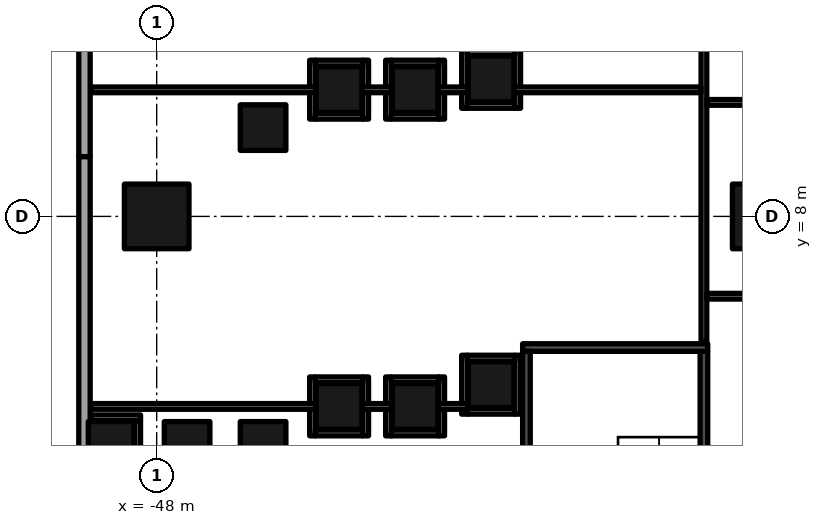
"""IFC4 building model, lengths in metres.
Left out: names, types, materials, properties, quantities, classifications, styles, units other than length and angle.
Written with IfcOpenShell. Run it as: python <this file> out.ifc"""

import sys

from ifc_helpers import new_model, si_unit, direction, frame, frame_2d, origin, origin_2d, place, context, subcontext, project, spatial, rectangle, extrude, element, fill, save


model = new_model("IFC4")
c1 = context("Model", 3, precision=1e-05, world=origin(), true_north=direction((0.0, 1.0)))
c2 = subcontext(c1, "Body", "Model", "MODEL_VIEW")
j1 = project(units=[si_unit("LENGTHUNIT", "METRE"), si_unit("PLANEANGLEUNIT", "RADIAN")], contexts=[c1])
p1 = place(None, origin())
s1 = spatial("IfcSite", under=j1, at=p1, CompositionType="ELEMENT")
p2 = place(p1, origin())
s2 = spatial("IfcBuilding", under=s1, at=p2, CompositionType="ELEMENT")
p3 = place(p2, origin())
s3 = spatial("IfcBuildingStorey", under=s2, at=p3, CompositionType="ELEMENT", Elevation=0.0)
for number, where, z_axis, x_axis in (
    (1, (-48.0, 8.0, 0.0), (0.0, 0.0, 1.0), (1.0, 0.0, 0.0)),
    (2, (-32.0, 8.0, 0.0), (0.0, 0.0, 1.0), (1.0, 0.0, 0.0)),
):
    element("IfcColumn", number, at=place(p3, frame(where, z_axis=z_axis, x_axis=x_axis)), inside=s3, PredefinedType="COLUMN", context=c2, shape_type="SweptSolid", body=[
        extrude(rectangle(XDim=1.7, YDim=1.7, at=origin_2d()), origin(), (0.0, 0.0, 1.0), 9.0),
    ])
for number, where, z_axis, x_axis in (
    (3, (-39.2, 3.572, 0.0), (0.0, 0.0, 1.0), (1.0, 0.0, 0.0)),
    (4, (-39.2, 11.62, 0.0), (0.0, 0.0, 1.0), (1.0, 0.0, 0.0)),
    (5, (-41.2, 3.001, 0.0), (0.0, 0.0, 1.0), (1.0, 0.0, 0.0)),
    (6, (-41.2, 11.337, 0.0), (0.0, 0.0, 1.0), (1.0, 0.0, 0.0)),
    (7, (-43.2, 3.001, 0.0), (0.0, 0.0, 1.0), (1.0, 0.0, 0.0)),
    (8, (-43.2, 11.337, 0.0), (0.0, 0.0, 1.0), (1.0, 0.0, 0.0)),
    (9, (-45.2, 2.001, 0.0), (0.0, 0.0, 1.0), (1.0, 0.0, 0.0)),
    (10, (-45.2, 10.337, 0.0), (0.0, 0.0, 1.0), (1.0, 0.0, 0.0)),
    (11, (-47.2, 2.001, 0.0), (0.0, 0.0, 1.0), (1.0, 0.0, 0.0)),
    (12, (-49.2, 2.001, 0.0), (0.0, 0.0, 1.0), (1.0, 0.0, 0.0)),
):
    element("IfcColumn", number, at=place(p3, frame(where, z_axis=z_axis, x_axis=x_axis)), inside=s3, PredefinedType="COLUMN", context=c2, shape_type="SweptSolid", body=[
        extrude(rectangle(XDim=1.2, YDim=1.2, at=origin_2d()), origin(), (0.0, 0.0, 1.0), 9.0),
    ])
p4 = place(p3, frame((-49.9, 13.673, 0.0), z_axis=(0.0, 0.0, 1.0), x_axis=(0.0, -1.0, 0.0)))
e13 = element("IfcWall", 13, at=p4, inside=s3, PredefinedType="ELEMENTEDWALL", context=c2, shape_type="SweptSolid", body=[
    extrude(rectangle(XDim=4.102, YDim=0.3, at=frame_2d((2.051, 0.0))), origin(), (0.0, 0.0, 1.0), 7.6),
])
p5 = place(p4, frame((0.327, 0.0, 0.0)))
e14 = element("IfcOpeningElement", 14, at=p5, cuts=e13, PredefinedType="OPENING", context=c2, shape_type="SweptSolid", body=[
    extrude(rectangle(XDim=1.2, YDim=2.7, at=frame_2d((0.6, 1.35))), frame((0.0, 0.16, 0.0), z_axis=(0.0, -1.0, 0.0), x_axis=(1.0, 0.0, 0.0)), (0.0, 0.0, 1.0), 0.32),
])
p6 = place(p3, frame((-49.9, 9.571, 0.0), z_axis=(0.0, 0.0, 1.0), x_axis=(0.0, -1.0, 0.0)))
e15 = element("IfcWall", 15, at=p6, inside=s3, PredefinedType="ELEMENTEDWALL", context=c2, shape_type="SweptSolid", body=[
    extrude(rectangle(XDim=7.673, YDim=0.3, at=frame_2d((3.836, 0.0))), origin(), (0.0, 0.0, 1.0), 7.6),
])
p7 = place(p6, frame((2.575, 0.0, 0.0)))
e16 = element("IfcOpeningElement", 16, at=p7, cuts=e15, PredefinedType="OPENING", context=c2, shape_type="SweptSolid", body=[
    extrude(rectangle(XDim=3.0, YDim=2.7, at=frame_2d((1.5, 1.35))), frame((0.0, 0.16, 0.0), z_axis=(0.0, -1.0, 0.0), x_axis=(1.0, 0.0, 0.0)), (0.0, 0.0, 1.0), 0.32),
])
for number, where, z_axis, x_axis in (
    (17, (-49.85, 18.79, 9.0), (0.0, 0.0, 1.0), (0.0, -1.0, 0.0)),
    (18, (-49.85, 4.093, 9.0), (0.0, 0.0, 1.0), (0.0, -1.0, 0.0)),
):
    element("IfcWall", number, at=place(p3, frame(where, z_axis=z_axis, x_axis=x_axis)), inside=s3, PredefinedType="PARAPET", context=c2, shape_type="SweptSolid", body=[
        extrude(rectangle(XDim=14.698, YDim=0.3, at=frame_2d((7.349, 0.0))), origin(), (0.0, 0.0, 1.0), 1.1),
    ])
p8 = place(p3, frame((-38.37, 4.55, 0.0), z_axis=(0.0, 0.0, 1.0), x_axis=(1.0, 0.0, 0.0)))
e19 = element("IfcWall", 19, at=p8, inside=s3, PredefinedType="SOLIDWALL", context=c2, shape_type="SweptSolid", body=[
    extrude(rectangle(XDim=4.87, YDim=0.2, at=frame_2d((2.435, 0.0))), origin(), (0.0, 0.0, 1.0), 8.5),
])
p9 = place(p3, frame((-38.27, -2.2, 0.0), z_axis=(0.0, 0.0, 1.0), x_axis=(0.0, 1.0, 0.0)))
e20 = element("IfcWall", 20, at=p9, inside=s3, PredefinedType="SOLIDWALL", context=c2, shape_type="SweptSolid", body=[
    extrude(rectangle(XDim=6.65, YDim=0.2, at=frame_2d((3.325, 0.0))), origin(), (0.0, 0.0, 1.0), 8.5),
])
p10 = place(p9, frame((0.1, 0.0, 0.0)))
e21 = element("IfcOpeningElement", 21, at=p10, cuts=e20, PredefinedType="OPENING", context=c2, shape_type="SweptSolid", body=[
    extrude(rectangle(XDim=1.8, YDim=2.4, at=frame_2d((0.9, 1.2))), frame((0.0, 0.11, 0.0), z_axis=(0.0, -1.0, 0.0), x_axis=(1.0, 0.0, 0.0)), (0.0, 0.0, 1.0), 0.22),
])
p11 = place(p3, frame((-33.6, -2.2, 0.0), z_axis=(0.0, 0.0, 1.0), x_axis=(0.0, 1.0, 0.0)))
e22 = element("IfcWall", 22, at=p11, inside=s3, PredefinedType="SOLIDWALL", context=c2, shape_type="SweptSolid", body=[
    extrude(rectangle(XDim=6.65, YDim=0.2, at=frame_2d((3.325, 0.0))), origin(), (0.0, 0.0, 1.0), 8.5),
])
p12 = place(p11, frame((0.1, 0.0, 0.0)))
e23 = element("IfcOpeningElement", 23, at=p12, cuts=e22, PredefinedType="OPENING", context=c2, shape_type="SweptSolid", body=[
    extrude(rectangle(XDim=1.8, YDim=2.4, at=frame_2d((0.9, 1.2))), frame((0.0, 0.11, 0.0), z_axis=(0.0, -1.0, 0.0), x_axis=(1.0, 0.0, 0.0)), (0.0, 0.0, 1.0), 0.22),
])
p13 = place(p3, frame((-48.5, 1.376, 0.0), z_axis=(0.0, 0.0, 1.0), x_axis=(0.0, 1.0, 0.0)))
e24 = element("IfcWall", 24, at=p13, inside=s3, PredefinedType="PARTITIONING", context=c2, shape_type="SweptSolid", body=[
    extrude(rectangle(XDim=1.25, YDim=0.15, at=frame_2d((0.625, 0.0))), origin(), (0.0, 0.0, 1.0), 8.5),
])
p14 = place(p3, frame((-43.9, 2.226, 0.0), z_axis=(0.0, 0.0, 1.0), x_axis=(0.0, 1.0, 0.0)))
e25 = element("IfcWall", 25, at=p14, inside=s3, PredefinedType="PARTITIONING", context=c2, shape_type="SweptSolid", body=[
    extrude(rectangle(XDim=1.55, YDim=0.15, at=frame_2d((0.775, 0.0))), origin(), (0.0, 0.0, 1.0), 8.5),
])
p15 = place(p3, frame((-43.825, 2.301, 0.0), z_axis=(0.0, 0.0, 1.0), x_axis=(1.0, 0.0, 0.0)))
e26 = element("IfcWall", 26, at=p15, inside=s3, PredefinedType="PARTITIONING", context=c2, shape_type="SweptSolid", body=[
    extrude(rectangle(XDim=1.25, YDim=0.15, at=frame_2d((0.625, 0.0))), origin(), (0.0, 0.0, 1.0), 8.5),
])
for number, where, z_axis, x_axis in (
    (27, (-42.5, 2.226, 0.0), (0.0, 0.0, 1.0), (0.0, 1.0, 0.0)),
    (28, (-41.9, 2.226, 0.0), (0.0, 0.0, 1.0), (0.0, 1.0, 0.0)),
):
    element("IfcWall", number, at=place(p3, frame(where, z_axis=z_axis, x_axis=x_axis)), inside=s3, PredefinedType="PARTITIONING", context=c2, shape_type="SweptSolid", body=[
        extrude(rectangle(XDim=1.55, YDim=0.15, at=frame_2d((0.775, 0.0))), origin(), (0.0, 0.0, 1.0), 8.5),
    ])
p16 = place(p3, frame((-41.825, 2.301, 0.0), z_axis=(0.0, 0.0, 1.0), x_axis=(1.0, 0.0, 0.0)))
e29 = element("IfcWall", 29, at=p16, inside=s3, PredefinedType="PARTITIONING", context=c2, shape_type="SweptSolid", body=[
    extrude(rectangle(XDim=1.25, YDim=0.15, at=frame_2d((0.625, 0.0))), origin(), (0.0, 0.0, 1.0), 8.5),
])
p17 = place(p3, frame((-40.5, 2.226, 0.0), z_axis=(0.0, 0.0, 1.0), x_axis=(0.0, 1.0, 0.0)))
e30 = element("IfcWall", 30, at=p17, inside=s3, PredefinedType="PARTITIONING", context=c2, shape_type="SweptSolid", body=[
    extrude(rectangle(XDim=1.55, YDim=0.15, at=frame_2d((0.775, 0.0))), origin(), (0.0, 0.0, 1.0), 8.5),
])
p18 = place(p3, frame((-49.72, 2.701, 0.0), z_axis=(0.0, 0.0, 1.0), x_axis=(1.0, 0.0, 0.0)))
e31 = element("IfcWall", 31, at=p18, inside=s3, PredefinedType="PARTITIONING", context=c2, shape_type="SweptSolid", body=[
    extrude(rectangle(XDim=1.295, YDim=0.15, at=frame_2d((0.647, 0.0))), origin(), (0.0, 0.0, 1.0), 8.5),
])
p19 = place(p3, frame((-39.9, 2.797, 0.0), z_axis=(0.0, 0.0, 1.0), x_axis=(0.0, 1.0, 0.0)))
e32 = element("IfcWall", 32, at=p19, inside=s3, PredefinedType="PARTITIONING", context=c2, shape_type="SweptSolid", body=[
    extrude(rectangle(XDim=1.55, YDim=0.15, at=frame_2d((0.775, 0.0))), origin(), (0.0, 0.0, 1.0), 8.5),
])
p20 = place(p3, frame((-39.825, 2.872, 0.0), z_axis=(0.0, 0.0, 1.0), x_axis=(1.0, 0.0, 0.0)))
e33 = element("IfcWall", 33, at=p20, inside=s3, PredefinedType="PARTITIONING", context=c2, shape_type="SweptSolid", body=[
    extrude(rectangle(XDim=1.25, YDim=0.15, at=frame_2d((0.625, 0.0))), origin(), (0.0, 0.0, 1.0), 8.5),
])
p21 = place(p3, frame((-38.5, 2.797, 0.0), z_axis=(0.0, 0.0, 1.0), x_axis=(0.0, 1.0, 0.0)))
e34 = element("IfcWall", 34, at=p21, inside=s3, PredefinedType="PARTITIONING", context=c2, shape_type="SweptSolid", body=[
    extrude(rectangle(XDim=1.55, YDim=0.15, at=frame_2d((0.775, 0.0))), origin(), (0.0, 0.0, 1.0), 8.5),
])
p22 = place(p3, frame((-49.72, 3.0, 0.0), z_axis=(0.0, 0.0, 1.0), x_axis=(1.0, 0.0, 0.0)))
e35 = element("IfcWall", 35, at=p22, inside=s3, PredefinedType="PARTITIONING", context=c2, shape_type="SweptSolid", body=[
    extrude(rectangle(XDim=5.92, YDim=0.15, at=frame_2d((2.96, 0.0))), origin(), (0.0, 0.0, 1.0), 7.6),
])
for number, where, z_axis, x_axis in (
    (36, (-42.6, 3.0, 0.0), (0.0, 0.0, 1.0), (1.0, 0.0, 0.0)),
    (37, (-40.6, 3.0, 0.0), (0.0, 0.0, 1.0), (1.0, 0.0, 0.0)),
):
    element("IfcWall", number, at=place(p3, frame(where, z_axis=z_axis, x_axis=x_axis)), inside=s3, PredefinedType="PARTITIONING", context=c2, shape_type="SweptSolid", body=[
        extrude(rectangle(XDim=0.8, YDim=0.15, at=frame_2d((0.4, 0.0))), origin(), (0.0, 0.0, 1.0), 8.5),
    ])
for number, where, z_axis, x_axis in (
    (38, (-43.825, 3.701, 0.0), (0.0, 0.0, 1.0), (1.0, 0.0, 0.0)),
    (39, (-41.825, 3.701, 0.0), (0.0, 0.0, 1.0), (1.0, 0.0, 0.0)),
    (40, (-39.825, 4.272, 0.0), (0.0, 0.0, 1.0), (1.0, 0.0, 0.0)),
):
    element("IfcWall", number, at=place(p3, frame(where, z_axis=z_axis, x_axis=x_axis)), inside=s3, PredefinedType="PARTITIONING", context=c2, shape_type="SweptSolid", body=[
        extrude(rectangle(XDim=1.25, YDim=0.15, at=frame_2d((0.625, 0.0))), origin(), (0.0, 0.0, 1.0), 8.5),
    ])
p23 = place(p3, frame((-33.6, 4.69, 0.0), z_axis=(0.0, 0.0, 1.0), x_axis=(0.0, 1.0, 0.0)))
e41 = element("IfcWall", 41, at=p23, inside=s3, PredefinedType="PARTITIONING", context=c2, shape_type="SweptSolid", body=[
    extrude(rectangle(XDim=9.07, YDim=0.15, at=frame_2d((4.535, 0.0))), origin(), (0.0, 0.0, 1.0), 7.3),
])
p24 = place(p3, frame((-33.525, 5.9, 0.0), z_axis=(0.0, 0.0, 1.0), x_axis=(1.0, 0.0, 0.0)))
e42 = element("IfcWall", 42, at=p24, inside=s3, PredefinedType="PARTITIONING", context=c2, shape_type="SweptSolid", body=[
    extrude(rectangle(XDim=3.85, YDim=0.15, at=frame_2d((1.925, 0.0))), origin(), (0.0, 0.0, 1.0), 7.3),
])
p25 = place(p3, frame((-43.9, 10.56, 0.0), z_axis=(0.0, 0.0, 1.0), x_axis=(0.0, 1.0, 0.0)))
e43 = element("IfcWall", 43, at=p25, inside=s3, PredefinedType="PARTITIONING", context=c2, shape_type="SweptSolid", body=[
    extrude(rectangle(XDim=1.55, YDim=0.15, at=frame_2d((0.775, 0.0))), origin(), (0.0, 0.0, 1.0), 8.5),
])
p26 = place(p3, frame((-43.825, 10.635, 0.0), z_axis=(0.0, 0.0, 1.0), x_axis=(1.0, 0.0, 0.0)))
e44 = element("IfcWall", 44, at=p26, inside=s3, PredefinedType="PARTITIONING", context=c2, shape_type="SweptSolid", body=[
    extrude(rectangle(XDim=1.25, YDim=0.15, at=frame_2d((0.625, 0.0))), origin(), (0.0, 0.0, 1.0), 8.5),
])
for number, where, z_axis, x_axis in (
    (45, (-42.5, 10.56, 0.0), (0.0, 0.0, 1.0), (0.0, 1.0, 0.0)),
    (46, (-41.9, 10.56, 0.0), (0.0, 0.0, 1.0), (0.0, 1.0, 0.0)),
):
    element("IfcWall", number, at=place(p3, frame(where, z_axis=z_axis, x_axis=x_axis)), inside=s3, PredefinedType="PARTITIONING", context=c2, shape_type="SweptSolid", body=[
        extrude(rectangle(XDim=1.55, YDim=0.15, at=frame_2d((0.775, 0.0))), origin(), (0.0, 0.0, 1.0), 8.5),
    ])
p27 = place(p3, frame((-41.825, 10.635, 0.0), z_axis=(0.0, 0.0, 1.0), x_axis=(1.0, 0.0, 0.0)))
e47 = element("IfcWall", 47, at=p27, inside=s3, PredefinedType="PARTITIONING", context=c2, shape_type="SweptSolid", body=[
    extrude(rectangle(XDim=1.25, YDim=0.15, at=frame_2d((0.625, 0.0))), origin(), (0.0, 0.0, 1.0), 8.5),
])
for number, where, z_axis, x_axis in (
    (48, (-40.5, 10.56, 0.0), (0.0, 0.0, 1.0), (0.0, 1.0, 0.0)),
    (49, (-39.9, 10.845, 0.0), (0.0, 0.0, 1.0), (0.0, 1.0, 0.0)),
):
    element("IfcWall", number, at=place(p3, frame(where, z_axis=z_axis, x_axis=x_axis)), inside=s3, PredefinedType="PARTITIONING", context=c2, shape_type="SweptSolid", body=[
        extrude(rectangle(XDim=1.55, YDim=0.15, at=frame_2d((0.775, 0.0))), origin(), (0.0, 0.0, 1.0), 8.5),
    ])
p28 = place(p3, frame((-39.825, 10.92, 0.0), z_axis=(0.0, 0.0, 1.0), x_axis=(1.0, 0.0, 0.0)))
e50 = element("IfcWall", 50, at=p28, inside=s3, PredefinedType="PARTITIONING", context=c2, shape_type="SweptSolid", body=[
    extrude(rectangle(XDim=1.25, YDim=0.15, at=frame_2d((0.625, 0.0))), origin(), (0.0, 0.0, 1.0), 8.5),
])
p29 = place(p3, frame((-38.5, 10.845, 0.0), z_axis=(0.0, 0.0, 1.0), x_axis=(0.0, 1.0, 0.0)))
e51 = element("IfcWall", 51, at=p29, inside=s3, PredefinedType="PARTITIONING", context=c2, shape_type="SweptSolid", body=[
    extrude(rectangle(XDim=1.55, YDim=0.15, at=frame_2d((0.775, 0.0))), origin(), (0.0, 0.0, 1.0), 8.5),
])
p30 = place(p3, frame((-33.525, 11.0, 0.0), z_axis=(0.0, 0.0, 1.0), x_axis=(1.0, 0.0, 0.0)))
e52 = element("IfcWall", 52, at=p30, inside=s3, PredefinedType="PARTITIONING", context=c2, shape_type="SweptSolid", body=[
    extrude(rectangle(XDim=3.85, YDim=0.15, at=frame_2d((1.925, 0.0))), origin(), (0.0, 0.0, 1.0), 7.3),
])
p31 = place(p30, frame((1.425, 0.0, 0.0)))
e53 = element("IfcOpeningElement", 53, at=p31, cuts=e52, PredefinedType="OPENING", context=c2, shape_type="SweptSolid", body=[
    extrude(rectangle(XDim=0.9, YDim=2.1, at=frame_2d((0.45, 1.05))), frame((0.0, 0.085, 0.0), z_axis=(0.0, -1.0, 0.0), x_axis=(1.0, 0.0, 0.0)), (0.0, 0.0, 1.0), 0.17),
])
p32 = place(p3, frame((-49.72, 11.33, 0.0), z_axis=(0.0, 0.0, 1.0), x_axis=(1.0, 0.0, 0.0)))
e54 = element("IfcWall", 54, at=p32, inside=s3, PredefinedType="PARTITIONING", context=c2, shape_type="SweptSolid", body=[
    extrude(rectangle(XDim=5.92, YDim=0.15, at=frame_2d((2.96, 0.0))), origin(), (0.0, 0.0, 1.0), 7.6),
])
for number, where, z_axis, x_axis in (
    (55, (-42.6, 11.33, 0.0), (0.0, 0.0, 1.0), (1.0, 0.0, 0.0)),
    (56, (-40.6, 11.33, 0.0), (0.0, 0.0, 1.0), (1.0, 0.0, 0.0)),
):
    element("IfcWall", number, at=place(p3, frame(where, z_axis=z_axis, x_axis=x_axis)), inside=s3, PredefinedType="PARTITIONING", context=c2, shape_type="SweptSolid", body=[
        extrude(rectangle(XDim=0.8, YDim=0.15, at=frame_2d((0.4, 0.0))), origin(), (0.0, 0.0, 1.0), 8.5),
    ])
p33 = place(p3, frame((-38.6, 11.33, 0.0), z_axis=(0.0, 0.0, 1.0), x_axis=(1.0, 0.0, 0.0)))
e57 = element("IfcWall", 57, at=p33, inside=s3, PredefinedType="PARTITIONING", context=c2, shape_type="SweptSolid", body=[
    extrude(rectangle(XDim=4.925, YDim=0.15, at=frame_2d((2.462, 0.0))), origin(), (0.0, 0.0, 1.0), 8.5),
])
for number, where, z_axis, x_axis in (
    (58, (-43.825, 12.035, 0.0), (0.0, 0.0, 1.0), (1.0, 0.0, 0.0)),
    (59, (-41.825, 12.035, 0.0), (0.0, 0.0, 1.0), (1.0, 0.0, 0.0)),
    (60, (-39.825, 12.32, 0.0), (0.0, 0.0, 1.0), (1.0, 0.0, 0.0)),
):
    element("IfcWall", number, at=place(p3, frame(where, z_axis=z_axis, x_axis=x_axis)), inside=s3, PredefinedType="PARTITIONING", context=c2, shape_type="SweptSolid", body=[
        extrude(rectangle(XDim=1.25, YDim=0.15, at=frame_2d((0.625, 0.0))), origin(), (0.0, 0.0, 1.0), 8.5),
    ])
p34 = place(p5, origin())
e61 = element("IfcDoor", 61, at=p34, inside=s3, OperationType="DOUBLE_DOOR_SINGLE_SWING", PredefinedType="DOOR", context=c2, shape_type="SweptSolid", body=[
    extrude(rectangle(XDim=1.2, YDim=2.7, at=frame_2d((0.6, 1.35))), frame((0.0, 0.025, 0.0), z_axis=(0.0, -1.0, 0.0), x_axis=(1.0, 0.0, 0.0)), (0.0, 0.0, 1.0), 0.05),
])
fill(e14, e61)
p35 = place(p7, origin())
e62 = element("IfcDoor", 62, at=p35, inside=s3, OperationType="DOUBLE_DOOR_SINGLE_SWING", PredefinedType="DOOR", context=c2, shape_type="SweptSolid", body=[
    extrude(rectangle(XDim=3.0, YDim=2.7, at=frame_2d((1.5, 1.35))), frame((0.0, 0.025, 0.0), z_axis=(0.0, -1.0, 0.0), x_axis=(1.0, 0.0, 0.0)), (0.0, 0.0, 1.0), 0.05),
])
fill(e16, e62)
save(model, sys.argv[1])
